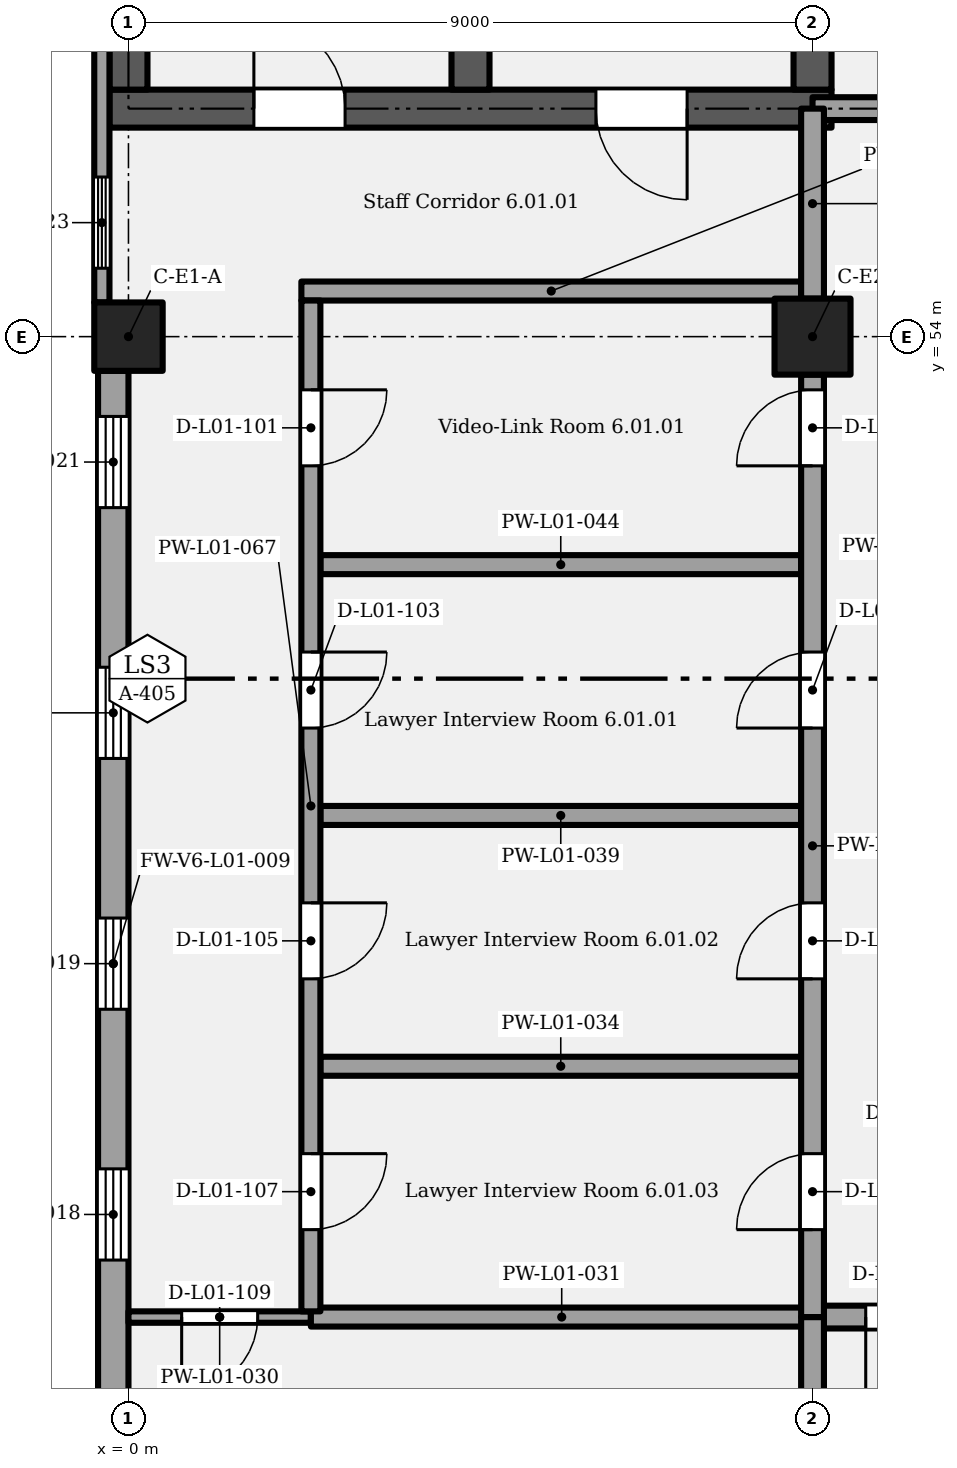
"""IFC4 building model, lengths in metres.
Left out: names, types, materials, properties, quantities, classifications, styles, units other than length and angle.
Written with IfcOpenShell. Run it as: python <this file> out.ifc"""

import sys

from ifc_helpers import new_model, si_unit, direction, frame, frame_2d, origin, origin_2d, place, context, subcontext, project, spatial, rectangle, extrude, element, fill, save


model = new_model("IFC4")
c1 = context("Model", 3, precision=1e-05, world=origin(), true_north=direction((0.0, 1.0)))
c2 = subcontext(c1, "Body", "Model", "MODEL_VIEW")
j1 = project(units=[si_unit("LENGTHUNIT", "METRE"), si_unit("PLANEANGLEUNIT", "RADIAN")], contexts=[c1])
p1 = place(None, origin())
s1 = spatial("IfcSite", under=j1, at=p1, CompositionType="ELEMENT")
p2 = place(p1, origin())
s2 = spatial("IfcBuilding", under=s1, at=p2, CompositionType="ELEMENT")
p3 = place(p2, frame((0.0, 0.0, 6.6)))
s3 = spatial("IfcBuildingStorey", under=s2, at=p3, CompositionType="ELEMENT", Elevation=6.6)
p4 = place(p3, frame((0.0, 54.0, 0.0), z_axis=(0.0, 0.0, 1.0), x_axis=(1.0, 0.0, 0.0)))
e1 = element("IfcColumn", 1, at=p4, inside=s3, PredefinedType="COLUMN", context=c2, shape_type="SweptSolid", body=[
    extrude(rectangle(XDim=0.9, YDim=0.9, at=origin_2d()), origin(), (0.0, 0.0, 1.0), 5.4),
])
p5 = place(p3, frame((9.0, 54.0, 0.0), z_axis=(0.0, 0.0, 1.0), x_axis=(1.0, 0.0, 0.0)))
e2 = element("IfcColumn", 2, at=p5, inside=s3, PredefinedType="COLUMN", context=c2, shape_type="SweptSolid", body=[
    extrude(rectangle(XDim=1.0, YDim=1.0, at=origin_2d()), origin(), (0.0, 0.0, 1.0), 5.4),
])
p6 = place(p3, frame((-0.25, 57.0, 0.0), z_axis=(0.0, 0.0, 1.0), x_axis=(1.0, 0.0, 0.0)))
e3 = element("IfcWall", 3, at=p6, inside=s3, PredefinedType="SHEAR", context=c2, shape_type="SweptSolid", body=[
    extrude(rectangle(XDim=9.5, YDim=0.5, at=frame_2d((4.75, 0.0))), origin(), (0.0, 0.0, 1.0), 5.1),
])
p7 = place(p6, frame((1.9, 0.0, 0.0)))
e4 = element("IfcOpeningElement", 4, at=p7, cuts=e3, PredefinedType="OPENING", context=c2, shape_type="SweptSolid", body=[
    extrude(rectangle(XDim=1.2, YDim=2.1, at=frame_2d((0.6, 1.05))), frame((0.0, 0.26, 0.0), z_axis=(0.0, -1.0, 0.0), x_axis=(1.0, 0.0, 0.0)), (0.0, 0.0, 1.0), 0.52),
])
p8 = place(p6, frame((7.6, 0.0, 0.0), z_axis=(0.0, 0.0, 1.0), x_axis=(-1.0, 0.0, 0.0)))
e5 = element("IfcOpeningElement", 5, at=p8, cuts=e3, PredefinedType="OPENING", context=c2, shape_type="SweptSolid", body=[
    extrude(rectangle(XDim=1.2, YDim=2.1, at=frame_2d((0.6, 1.05))), frame((0.0, 0.26, 0.0), z_axis=(0.0, -1.0, 0.0), x_axis=(1.0, 0.0, 0.0)), (0.0, 0.0, 1.0), 0.52),
])
p9 = place(p3, frame((0.0, 57.25, 0.0), z_axis=(0.0, 0.0, 1.0), x_axis=(0.0, 1.0, 0.0)))
e6 = element("IfcWall", 6, at=p9, inside=s3, PredefinedType="SHEAR", context=c2, shape_type="SweptSolid", body=[
    extrude(rectangle(XDim=8.3, YDim=0.5, at=frame_2d((4.15, 0.0))), origin(), (0.0, 0.0, 1.0), 5.1),
])
p10 = place(p3, frame((4.5, 57.25, 0.0), z_axis=(0.0, 0.0, 1.0), x_axis=(0.0, 1.0, 0.0)))
e7 = element("IfcWall", 7, at=p10, inside=s3, PredefinedType="SHEAR", context=c2, shape_type="SweptSolid", body=[
    extrude(rectangle(XDim=8.5, YDim=0.5, at=frame_2d((4.25, 0.0))), origin(), (0.0, 0.0, 1.0), 5.1),
])
p11 = place(p3, frame((9.0, 57.25, 0.0), z_axis=(0.0, 0.0, 1.0), x_axis=(0.0, 1.0, 0.0)))
e8 = element("IfcWall", 8, at=p11, inside=s3, PredefinedType="SHEAR", context=c2, shape_type="SweptSolid", body=[
    extrude(rectangle(XDim=8.3, YDim=0.5, at=frame_2d((4.15, 0.0))), origin(), (0.0, 0.0, 1.0), 5.1),
])
p12 = place(p3, frame((-0.2, 37.95, 0.0), z_axis=(0.0, 0.0, 1.0), x_axis=(0.0, 1.0, 0.0)))
e9 = element("IfcWall", 9, at=p12, inside=s3, PredefinedType="SOLIDWALL", context=c2, shape_type="SweptSolid", body=[
    extrude(rectangle(XDim=15.6, YDim=0.4, at=frame_2d((7.8, 0.0))), origin(), (0.0, 0.0, 1.0), 5.1),
])
p13 = place(p12, frame((3.9, 0.0, 0.9)))
e10 = element("IfcOpeningElement", 10, at=p13, cuts=e9, PredefinedType="OPENING", context=c2, shape_type="SweptSolid", body=[
    extrude(rectangle(XDim=1.2, YDim=2.4, at=frame_2d((0.6, 1.2))), frame((0.0, 0.21, 0.0), z_axis=(0.0, -1.0, 0.0), x_axis=(1.0, 0.0, 0.0)), (0.0, 0.0, 1.0), 0.42),
])
p14 = place(p12, frame((7.2, 0.0, 0.9)))
e11 = element("IfcOpeningElement", 11, at=p14, cuts=e9, PredefinedType="OPENING", context=c2, shape_type="SweptSolid", body=[
    extrude(rectangle(XDim=1.2, YDim=2.4, at=frame_2d((0.6, 1.2))), frame((0.0, 0.21, 0.0), z_axis=(0.0, -1.0, 0.0), x_axis=(1.0, 0.0, 0.0)), (0.0, 0.0, 1.0), 0.42),
])
p15 = place(p12, frame((10.5, 0.0, 0.9)))
e12 = element("IfcOpeningElement", 12, at=p15, cuts=e9, PredefinedType="OPENING", context=c2, shape_type="SweptSolid", body=[
    extrude(rectangle(XDim=1.2, YDim=2.4, at=frame_2d((0.6, 1.2))), frame((0.0, 0.21, 0.0), z_axis=(0.0, -1.0, 0.0), x_axis=(1.0, 0.0, 0.0)), (0.0, 0.0, 1.0), 0.42),
])
p16 = place(p12, frame((13.8, 0.0, 0.9)))
e13 = element("IfcOpeningElement", 13, at=p16, cuts=e9, PredefinedType="OPENING", context=c2, shape_type="SweptSolid", body=[
    extrude(rectangle(XDim=1.2, YDim=2.4, at=frame_2d((0.6, 1.2))), frame((0.0, 0.21, 0.0), z_axis=(0.0, -1.0, 0.0), x_axis=(1.0, 0.0, 0.0)), (0.0, 0.0, 1.0), 0.42),
])
p17 = place(p12, frame((0.475, 0.0, 1.5)))
e14 = element("IfcOpeningElement", 14, at=p17, cuts=e9, PredefinedType="OPENING", context=c2, shape_type="SweptSolid", body=[
    extrude(rectangle(XDim=0.9, YDim=1.8, at=frame_2d((0.45, 0.9))), frame((0.0, 0.21, 0.0), z_axis=(0.0, -1.0, 0.0), x_axis=(1.0, 0.0, 0.0)), (0.0, 0.0, 1.0), 0.42),
])
p18 = place(p3, frame((-0.35, 54.45, 0.0), z_axis=(0.0, 0.0, 1.0), x_axis=(0.0, 1.0, 0.0)))
e15 = element("IfcWall", 15, at=p18, inside=s3, PredefinedType="SOLIDWALL", context=c2, shape_type="SweptSolid", body=[
    extrude(rectangle(XDim=11.1, YDim=0.2, at=frame_2d((5.55, 0.0))), origin(), (0.0, 0.0, 1.0), 5.1),
])
p19 = place(p18, frame((0.45, 0.0, 0.9)))
e16 = element("IfcOpeningElement", 16, at=p19, cuts=e15, PredefinedType="OPENING", context=c2, shape_type="SweptSolid", body=[
    extrude(rectangle(XDim=1.2, YDim=2.4, at=frame_2d((0.6, 1.2))), frame((0.0, 0.11, 0.0), z_axis=(0.0, -1.0, 0.0), x_axis=(1.0, 0.0, 0.0)), (0.0, 0.0, 1.0), 0.22),
])
p20 = place(p3, frame((0.0, 41.1, 0.0), z_axis=(0.0, 0.0, 1.0), x_axis=(1.0, 0.0, 0.0)))
e17 = element("IfcWall", 17, at=p20, inside=s3, PredefinedType="PARTITIONING", context=c2, shape_type="SweptSolid", body=[
    extrude(rectangle(XDim=2.4, YDim=0.15, at=frame_2d((1.2, 0.0))), origin(), (0.0, 0.0, 1.0), 5.1),
])
p21 = place(p20, frame((1.7, 0.0, 0.0), z_axis=(0.0, 0.0, 1.0), x_axis=(-1.0, 0.0, 0.0)))
e18 = element("IfcOpeningElement", 18, at=p21, cuts=e17, PredefinedType="OPENING", context=c2, shape_type="SweptSolid", body=[
    extrude(rectangle(XDim=1.0, YDim=2.1, at=frame_2d((0.5, 1.05))), frame((0.0, 0.085, 0.0), z_axis=(0.0, -1.0, 0.0), x_axis=(1.0, 0.0, 0.0)), (0.0, 0.0, 1.0), 0.17),
])
p22 = place(p3, frame((2.4, 41.1, 0.0), z_axis=(0.0, 0.0, 1.0), x_axis=(1.0, 0.0, 0.0)))
e19 = element("IfcWall", 19, at=p22, inside=s3, PredefinedType="PARTITIONING", context=c2, shape_type="SweptSolid", body=[
    extrude(rectangle(XDim=6.6, YDim=0.25, at=frame_2d((3.3, 0.0))), origin(), (0.0, 0.0, 1.0), 5.1),
])
p23 = place(p3, frame((9.0, 41.1, 0.0), z_axis=(0.0, 0.0, 1.0), x_axis=(1.0, 0.0, 0.0)))
e20 = element("IfcWall", 20, at=p23, inside=s3, PredefinedType="PARTITIONING", context=c2, shape_type="SweptSolid", body=[
    extrude(rectangle(XDim=8.85, YDim=0.3, at=frame_2d((4.425, 0.0))), origin(), (0.0, 0.0, 1.0), 5.1),
])
p24 = place(p23, frame((1.7, 0.0, 0.0), z_axis=(0.0, 0.0, 1.0), x_axis=(-1.0, 0.0, 0.0)))
e21 = element("IfcOpeningElement", 21, at=p24, cuts=e20, PredefinedType="OPENING", context=c2, shape_type="SweptSolid", body=[
    extrude(rectangle(XDim=1.0, YDim=2.1, at=frame_2d((0.5, 1.05))), frame((0.0, 0.16, 0.0), z_axis=(0.0, -1.0, 0.0), x_axis=(1.0, 0.0, 0.0)), (0.0, 0.0, 1.0), 0.32),
])
for number, where, z_axis, x_axis in (
    (22, (2.525, 44.4, 0.0), (0.0, 0.0, 1.0), (1.0, 0.0, 0.0)),
    (23, (2.525, 47.7, 0.0), (0.0, 0.0, 1.0), (1.0, 0.0, 0.0)),
    (24, (2.525, 51.0, 0.0), (0.0, 0.0, 1.0), (1.0, 0.0, 0.0)),
):
    element("IfcWall", number, at=place(p3, frame(where, z_axis=z_axis, x_axis=x_axis)), inside=s3, PredefinedType="PARTITIONING", context=c2, shape_type="SweptSolid", body=[
        extrude(rectangle(XDim=6.325, YDim=0.25, at=frame_2d((3.163, 0.0))), origin(), (0.0, 0.0, 1.0), 5.1),
    ])
p25 = place(p3, frame((2.275, 54.6, 0.0), z_axis=(0.0, 0.0, 1.0), x_axis=(1.0, 0.0, 0.0)))
e25 = element("IfcWall", 25, at=p25, inside=s3, PredefinedType="PARTITIONING", context=c2, shape_type="SweptSolid", body=[
    extrude(rectangle(XDim=6.575, YDim=0.25, at=frame_2d((3.288, 0.0))), origin(), (0.0, 0.0, 1.0), 5.1),
])
p26 = place(p3, frame((9.0, 57.0, 0.0), z_axis=(0.0, 0.0, 1.0), x_axis=(1.0, 0.0, 0.0)))
e26 = element("IfcWall", 26, at=p26, inside=s3, PredefinedType="PARTITIONING", context=c2, shape_type="SweptSolid", body=[
    extrude(rectangle(XDim=9.0, YDim=0.3, at=frame_2d((4.5, 0.0))), origin(), (0.0, 0.0, 1.0), 5.1),
])
p27 = place(p26, frame((3.9, 0.0, 0.0)))
e27 = element("IfcOpeningElement", 27, at=p27, cuts=e26, PredefinedType="OPENING", context=c2, shape_type="SweptSolid", body=[
    extrude(rectangle(XDim=1.2, YDim=2.1, at=frame_2d((0.6, 1.05))), frame((0.0, 0.16, 0.0), z_axis=(0.0, -1.0, 0.0), x_axis=(1.0, 0.0, 0.0)), (0.0, 0.0, 1.0), 0.32),
])
p28 = place(p3, frame((2.4, 41.175, 0.0), z_axis=(0.0, 0.0, 1.0), x_axis=(0.0, 1.0, 0.0)))
e28 = element("IfcWall", 28, at=p28, inside=s3, PredefinedType="PARTITIONING", context=c2, shape_type="SweptSolid", body=[
    extrude(rectangle(XDim=13.3, YDim=0.25, at=frame_2d((6.65, 0.0))), origin(), (0.0, 0.0, 1.0), 5.1),
])
p29 = place(p28, frame((12.125, 0.0, 0.0), z_axis=(0.0, 0.0, 1.0), x_axis=(-1.0, 0.0, 0.0)))
e29 = element("IfcOpeningElement", 29, at=p29, cuts=e28, PredefinedType="OPENING", context=c2, shape_type="SweptSolid", body=[
    extrude(rectangle(XDim=1.0, YDim=2.1, at=frame_2d((0.5, 1.05))), frame((0.0, 0.135, 0.0), z_axis=(0.0, -1.0, 0.0), x_axis=(1.0, 0.0, 0.0)), (0.0, 0.0, 1.0), 0.27),
])
p30 = place(p28, frame((8.675, 0.0, 0.0), z_axis=(0.0, 0.0, 1.0), x_axis=(-1.0, 0.0, 0.0)))
e30 = element("IfcOpeningElement", 30, at=p30, cuts=e28, PredefinedType="OPENING", context=c2, shape_type="SweptSolid", body=[
    extrude(rectangle(XDim=1.0, YDim=2.1, at=frame_2d((0.5, 1.05))), frame((0.0, 0.135, 0.0), z_axis=(0.0, -1.0, 0.0), x_axis=(1.0, 0.0, 0.0)), (0.0, 0.0, 1.0), 0.27),
])
p31 = place(p28, frame((5.375, 0.0, 0.0), z_axis=(0.0, 0.0, 1.0), x_axis=(-1.0, 0.0, 0.0)))
e31 = element("IfcOpeningElement", 31, at=p31, cuts=e28, PredefinedType="OPENING", context=c2, shape_type="SweptSolid", body=[
    extrude(rectangle(XDim=1.0, YDim=2.1, at=frame_2d((0.5, 1.05))), frame((0.0, 0.135, 0.0), z_axis=(0.0, -1.0, 0.0), x_axis=(1.0, 0.0, 0.0)), (0.0, 0.0, 1.0), 0.27),
])
p32 = place(p28, frame((2.075, 0.0, 0.0), z_axis=(0.0, 0.0, 1.0), x_axis=(-1.0, 0.0, 0.0)))
e32 = element("IfcOpeningElement", 32, at=p32, cuts=e28, PredefinedType="OPENING", context=c2, shape_type="SweptSolid", body=[
    extrude(rectangle(XDim=1.0, YDim=2.1, at=frame_2d((0.5, 1.05))), frame((0.0, 0.135, 0.0), z_axis=(0.0, -1.0, 0.0), x_axis=(1.0, 0.0, 0.0)), (0.0, 0.0, 1.0), 0.27),
])
p33 = place(p3, frame((9.0, 38.0, 0.0), z_axis=(0.0, 0.0, 1.0), x_axis=(0.0, 1.0, 0.0)))
e33 = element("IfcWall", 33, at=p33, inside=s3, PredefinedType="PARTITIONING", context=c2, shape_type="SweptSolid", body=[
    extrude(rectangle(XDim=3.1, YDim=0.3, at=frame_2d((1.55, 0.0))), origin(), (0.0, 0.0, 1.0), 4.15),
])
p34 = place(p3, frame((9.0, 41.1, 0.0), z_axis=(0.0, 0.0, 1.0), x_axis=(0.0, 1.0, 0.0)))
e34 = element("IfcWall", 34, at=p34, inside=s3, PredefinedType="PARTITIONING", context=c2, shape_type="SweptSolid", body=[
    extrude(rectangle(XDim=12.4, YDim=0.3, at=frame_2d((6.2, 0.0))), origin(), (0.0, 0.0, 1.0), 4.15),
])
p35 = place(p34, frame((11.2, 0.0, 0.0)))
e35 = element("IfcOpeningElement", 35, at=p35, cuts=e34, PredefinedType="OPENING", context=c2, shape_type="SweptSolid", body=[
    extrude(rectangle(XDim=1.0, YDim=2.1, at=frame_2d((0.5, 1.05))), frame((0.0, 0.16, 0.0), z_axis=(0.0, -1.0, 0.0), x_axis=(1.0, 0.0, 0.0)), (0.0, 0.0, 1.0), 0.32),
])
p36 = place(p34, frame((7.75, 0.0, 0.0)))
e36 = element("IfcOpeningElement", 36, at=p36, cuts=e34, PredefinedType="OPENING", context=c2, shape_type="SweptSolid", body=[
    extrude(rectangle(XDim=1.0, YDim=2.1, at=frame_2d((0.5, 1.05))), frame((0.0, 0.16, 0.0), z_axis=(0.0, -1.0, 0.0), x_axis=(1.0, 0.0, 0.0)), (0.0, 0.0, 1.0), 0.32),
])
p37 = place(p34, frame((4.45, 0.0, 0.0)))
e37 = element("IfcOpeningElement", 37, at=p37, cuts=e34, PredefinedType="OPENING", context=c2, shape_type="SweptSolid", body=[
    extrude(rectangle(XDim=1.0, YDim=2.1, at=frame_2d((0.5, 1.05))), frame((0.0, 0.16, 0.0), z_axis=(0.0, -1.0, 0.0), x_axis=(1.0, 0.0, 0.0)), (0.0, 0.0, 1.0), 0.32),
])
p38 = place(p34, frame((1.15, 0.0, 0.0)))
e38 = element("IfcOpeningElement", 38, at=p38, cuts=e34, PredefinedType="OPENING", context=c2, shape_type="SweptSolid", body=[
    extrude(rectangle(XDim=1.0, YDim=2.1, at=frame_2d((0.5, 1.05))), frame((0.0, 0.16, 0.0), z_axis=(0.0, -1.0, 0.0), x_axis=(1.0, 0.0, 0.0)), (0.0, 0.0, 1.0), 0.32),
])
p39 = place(p3, frame((9.0, 54.5, 0.0), z_axis=(0.0, 0.0, 1.0), x_axis=(0.0, 1.0, 0.0)))
e39 = element("IfcWall", 39, at=p39, inside=s3, PredefinedType="PARTITIONING", context=c2, shape_type="SweptSolid", body=[
    extrude(rectangle(XDim=2.5, YDim=0.3, at=frame_2d((1.25, 0.0))), origin(), (0.0, 0.0, 1.0), 4.35),
])
p40 = place(p13, origin())
e40 = element("IfcWindow", 40, at=p40, inside=s3, PartitioningType="SINGLE_PANEL", PredefinedType="WINDOW", context=c2, shape_type="SweptSolid", body=[
    extrude(rectangle(XDim=1.2, YDim=2.4, at=frame_2d((0.6, 1.2))), frame((0.0, 0.03, 0.0), z_axis=(0.0, -1.0, 0.0), x_axis=(1.0, 0.0, 0.0)), (0.0, 0.0, 1.0), 0.06),
])
fill(e10, e40)
p41 = place(p14, origin())
e41 = element("IfcWindow", 41, at=p41, inside=s3, PartitioningType="SINGLE_PANEL", PredefinedType="WINDOW", context=c2, shape_type="SweptSolid", body=[
    extrude(rectangle(XDim=1.2, YDim=2.4, at=frame_2d((0.6, 1.2))), frame((0.0, 0.03, 0.0), z_axis=(0.0, -1.0, 0.0), x_axis=(1.0, 0.0, 0.0)), (0.0, 0.0, 1.0), 0.06),
])
fill(e11, e41)
p42 = place(p15, origin())
e42 = element("IfcWindow", 42, at=p42, inside=s3, PartitioningType="SINGLE_PANEL", PredefinedType="WINDOW", context=c2, shape_type="SweptSolid", body=[
    extrude(rectangle(XDim=1.2, YDim=2.4, at=frame_2d((0.6, 1.2))), frame((0.0, 0.03, 0.0), z_axis=(0.0, -1.0, 0.0), x_axis=(1.0, 0.0, 0.0)), (0.0, 0.0, 1.0), 0.06),
])
fill(e12, e42)
p43 = place(p16, origin())
e43 = element("IfcWindow", 43, at=p43, inside=s3, PartitioningType="SINGLE_PANEL", PredefinedType="WINDOW", context=c2, shape_type="SweptSolid", body=[
    extrude(rectangle(XDim=1.2, YDim=2.4, at=frame_2d((0.6, 1.2))), frame((0.0, 0.03, 0.0), z_axis=(0.0, -1.0, 0.0), x_axis=(1.0, 0.0, 0.0)), (0.0, 0.0, 1.0), 0.06),
])
fill(e13, e43)
p44 = place(p19, origin())
e44 = element("IfcWindow", 44, at=p44, inside=s3, PartitioningType="SINGLE_PANEL", PredefinedType="WINDOW", context=c2, shape_type="SweptSolid", body=[
    extrude(rectangle(XDim=1.2, YDim=2.4, at=frame_2d((0.6, 1.2))), frame((0.0, 0.03, 0.0), z_axis=(0.0, -1.0, 0.0), x_axis=(1.0, 0.0, 0.0)), (0.0, 0.0, 1.0), 0.06),
])
fill(e16, e44)
p45 = place(p7, origin())
e45 = element("IfcDoor", 45, at=p45, inside=s3, OperationType="SINGLE_SWING_LEFT", PredefinedType="DOOR", context=c2, shape_type="SweptSolid", body=[
    extrude(rectangle(XDim=1.2, YDim=2.1, at=frame_2d((0.6, 1.05))), frame((0.0, 0.025, 0.0), z_axis=(0.0, -1.0, 0.0), x_axis=(1.0, 0.0, 0.0)), (0.0, 0.0, 1.0), 0.05),
])
fill(e4, e45)
p46 = place(p8, origin())
e46 = element("IfcDoor", 46, at=p46, inside=s3, OperationType="SINGLE_SWING_LEFT", PredefinedType="DOOR", context=c2, shape_type="SweptSolid", body=[
    extrude(rectangle(XDim=1.2, YDim=2.1, at=frame_2d((0.6, 1.05))), frame((0.0, 0.025, 0.0), z_axis=(0.0, -1.0, 0.0), x_axis=(1.0, 0.0, 0.0)), (0.0, 0.0, 1.0), 0.05),
])
fill(e5, e46)
p47 = place(p29, origin())
e47 = element("IfcDoor", 47, at=p47, inside=s3, OperationType="SINGLE_SWING_LEFT", PredefinedType="DOOR", context=c2, shape_type="SweptSolid", body=[
    extrude(rectangle(XDim=1.0, YDim=2.1, at=frame_2d((0.5, 1.05))), frame((0.0, 0.025, 0.0), z_axis=(0.0, -1.0, 0.0), x_axis=(1.0, 0.0, 0.0)), (0.0, 0.0, 1.0), 0.05),
])
fill(e29, e47)
p48 = place(p35, origin())
e48 = element("IfcDoor", 48, at=p48, inside=s3, OperationType="SINGLE_SWING_LEFT", PredefinedType="DOOR", context=c2, shape_type="SweptSolid", body=[
    extrude(rectangle(XDim=1.0, YDim=2.1, at=frame_2d((0.5, 1.05))), frame((0.0, 0.025, 0.0), z_axis=(0.0, -1.0, 0.0), x_axis=(1.0, 0.0, 0.0)), (0.0, 0.0, 1.0), 0.05),
])
fill(e35, e48)
p49 = place(p30, origin())
e49 = element("IfcDoor", 49, at=p49, inside=s3, OperationType="SINGLE_SWING_LEFT", PredefinedType="DOOR", context=c2, shape_type="SweptSolid", body=[
    extrude(rectangle(XDim=1.0, YDim=2.1, at=frame_2d((0.5, 1.05))), frame((0.0, 0.025, 0.0), z_axis=(0.0, -1.0, 0.0), x_axis=(1.0, 0.0, 0.0)), (0.0, 0.0, 1.0), 0.05),
])
fill(e30, e49)
p50 = place(p36, origin())
e50 = element("IfcDoor", 50, at=p50, inside=s3, OperationType="SINGLE_SWING_LEFT", PredefinedType="DOOR", context=c2, shape_type="SweptSolid", body=[
    extrude(rectangle(XDim=1.0, YDim=2.1, at=frame_2d((0.5, 1.05))), frame((0.0, 0.025, 0.0), z_axis=(0.0, -1.0, 0.0), x_axis=(1.0, 0.0, 0.0)), (0.0, 0.0, 1.0), 0.05),
])
fill(e36, e50)
p51 = place(p31, origin())
e51 = element("IfcDoor", 51, at=p51, inside=s3, OperationType="SINGLE_SWING_LEFT", PredefinedType="DOOR", context=c2, shape_type="SweptSolid", body=[
    extrude(rectangle(XDim=1.0, YDim=2.1, at=frame_2d((0.5, 1.05))), frame((0.0, 0.025, 0.0), z_axis=(0.0, -1.0, 0.0), x_axis=(1.0, 0.0, 0.0)), (0.0, 0.0, 1.0), 0.05),
])
fill(e31, e51)
p52 = place(p37, origin())
e52 = element("IfcDoor", 52, at=p52, inside=s3, OperationType="SINGLE_SWING_LEFT", PredefinedType="DOOR", context=c2, shape_type="SweptSolid", body=[
    extrude(rectangle(XDim=1.0, YDim=2.1, at=frame_2d((0.5, 1.05))), frame((0.0, 0.025, 0.0), z_axis=(0.0, -1.0, 0.0), x_axis=(1.0, 0.0, 0.0)), (0.0, 0.0, 1.0), 0.05),
])
fill(e37, e52)
p53 = place(p32, origin())
e53 = element("IfcDoor", 53, at=p53, inside=s3, OperationType="SINGLE_SWING_LEFT", PredefinedType="DOOR", context=c2, shape_type="SweptSolid", body=[
    extrude(rectangle(XDim=1.0, YDim=2.1, at=frame_2d((0.5, 1.05))), frame((0.0, 0.025, 0.0), z_axis=(0.0, -1.0, 0.0), x_axis=(1.0, 0.0, 0.0)), (0.0, 0.0, 1.0), 0.05),
])
fill(e32, e53)
p54 = place(p38, origin())
e54 = element("IfcDoor", 54, at=p54, inside=s3, OperationType="SINGLE_SWING_LEFT", PredefinedType="DOOR", context=c2, shape_type="SweptSolid", body=[
    extrude(rectangle(XDim=1.0, YDim=2.1, at=frame_2d((0.5, 1.05))), frame((0.0, 0.025, 0.0), z_axis=(0.0, -1.0, 0.0), x_axis=(1.0, 0.0, 0.0)), (0.0, 0.0, 1.0), 0.05),
])
fill(e38, e54)
p55 = place(p21, origin())
e55 = element("IfcDoor", 55, at=p55, inside=s3, OperationType="SINGLE_SWING_RIGHT", PredefinedType="DOOR", context=c2, shape_type="SweptSolid", body=[
    extrude(rectangle(XDim=1.0, YDim=2.1, at=frame_2d((0.5, 1.05))), frame((0.0, 0.025, 0.0), z_axis=(0.0, -1.0, 0.0), x_axis=(1.0, 0.0, 0.0)), (0.0, 0.0, 1.0), 0.05),
])
fill(e18, e55)
p56 = place(p24, origin())
e56 = element("IfcDoor", 56, at=p56, inside=s3, OperationType="SINGLE_SWING_RIGHT", PredefinedType="DOOR", context=c2, shape_type="SweptSolid", body=[
    extrude(rectangle(XDim=1.0, YDim=2.1, at=frame_2d((0.5, 1.05))), frame((0.0, 0.025, 0.0), z_axis=(0.0, -1.0, 0.0), x_axis=(1.0, 0.0, 0.0)), (0.0, 0.0, 1.0), 0.05),
])
fill(e21, e56)
save(model, sys.argv[1])
